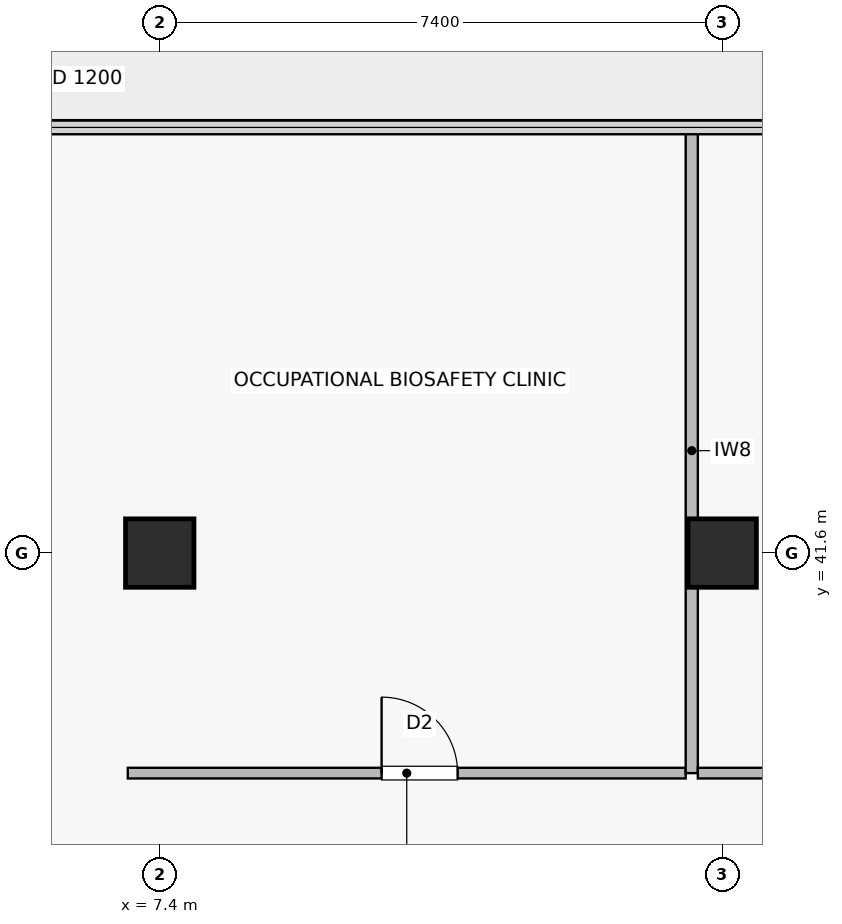
"""IFC4 building model, lengths in metres.
Left out: names, types, materials, properties, quantities, classifications, styles, units other than length and angle.
Written with IfcOpenShell. Run it as: python <this file> out.ifc"""

import sys

from ifc_helpers import new_model, si_unit, direction, frame, frame_2d, origin, origin_2d, place, context, subcontext, project, spatial, rectangle, extrude, source, transform, mapped, element, fill, save


model = new_model("IFC4")
c1 = context("Model", 3, precision=1e-05, world=origin(), true_north=direction((0.0, 1.0)))
c2 = subcontext(c1, "Body", "Model", "MODEL_VIEW")
j1 = project(units=[si_unit("LENGTHUNIT", "METRE"), si_unit("PLANEANGLEUNIT", "RADIAN")], contexts=[c1])
p1 = place(None, origin())
s1 = spatial("IfcSite", under=j1, at=p1, CompositionType="ELEMENT")
p2 = place(p1, origin())
s2 = spatial("IfcBuilding", under=s1, at=p2, CompositionType="ELEMENT")
p3 = place(p2, frame((0.0, 0.0, 113.3)))
s3 = spatial("IfcBuildingStorey", under=s2, at=p3, CompositionType="ELEMENT", Elevation=113.3)
m1 = source(origin(), c2, "Body", "SweptSolid", [
    extrude(rectangle(XDim=0.9, YDim=0.9, at=origin_2d()), origin(), (0.0, 0.0, 1.0), 4.1),
])
for number, where, z_axis, x_axis in (
    (1, (14.8, 41.6, 0.0), (0.0, 0.0, 1.0), (1.0, 0.0, 0.0)),
    (2, (7.4, 41.6, 0.0), (0.0, 0.0, 1.0), (1.0, 0.0, 0.0)),
):
    element("IfcColumn", number, at=place(p3, frame(where, z_axis=z_axis, x_axis=x_axis)), inside=s3, PredefinedType="COLUMN", context=c2, shape_type="MappedRepresentation", body=[
        mapped(m1, transform((0.0, 0.0, 0.0), scale=1.0)),
    ])
p4 = place(p3, frame((6.98, 38.705, 0.0), z_axis=(0.0, 0.0, 1.0), x_axis=(1.0, 0.0, 0.0)))
e3 = element("IfcWall", 3, at=p4, inside=s3, PredefinedType="PARTITIONING", context=c2, shape_type="SweptSolid", body=[
    extrude(rectangle(XDim=7.34, YDim=0.14, at=frame_2d((3.67, 0.0))), origin(), (0.0, 0.0, 1.0), 3.275),
])
p5 = place(p4, frame((3.339, 0.0, 0.0)))
e4 = element("IfcOpeningElement", 4, at=p5, cuts=e3, PredefinedType="OPENING", context=c2, shape_type="SweptSolid", body=[
    extrude(rectangle(XDim=1.0, YDim=2.15, at=frame_2d((0.5, 1.075))), frame((0.0, 0.08, 0.0), z_axis=(0.0, -1.0, 0.0), x_axis=(1.0, 0.0, 0.0)), (0.0, 0.0, 1.0), 0.16),
])
p6 = place(p3, frame((14.4, 38.705, 0.0), z_axis=(0.0, 0.0, 1.0), x_axis=(0.0, 1.0, 0.0)))
e5 = element("IfcWall", 5, at=p6, inside=s3, PredefinedType="PARTITIONING", context=c2, shape_type="SweptSolid", body=[
    extrude(rectangle(XDim=8.485, YDim=0.16, at=frame_2d((4.242, 0.0))), origin(), (0.0, 0.0, 1.0), 3.075),
])
p7 = place(p3, frame((14.48, 38.705, 0.0), z_axis=(0.0, 0.0, 1.0), x_axis=(1.0, 0.0, 0.0)))
e6 = element("IfcWall", 6, at=p7, inside=s3, PredefinedType="PARTITIONING", context=c2, shape_type="SweptSolid", body=[
    extrude(rectangle(XDim=12.24, YDim=0.14, at=frame_2d((6.12, 0.0))), origin(), (0.0, 0.0, 1.0), 3.125),
])
p8 = place(p7, frame((4.63, 0.0, 0.0)))
e7 = element("IfcOpeningElement", 7, at=p8, cuts=e6, PredefinedType="OPENING", context=c2, shape_type="SweptSolid", body=[
    extrude(rectangle(XDim=1.1, YDim=2.18, at=frame_2d((0.55, 1.09))), frame((0.0, 0.08, 0.0), z_axis=(0.0, -1.0, 0.0), x_axis=(1.0, 0.0, 0.0)), (0.0, 0.0, 1.0), 0.16),
])
m2 = source(origin(), c2, "Body", "SweptSolid", [
    extrude(rectangle(XDim=1.0, YDim=2.15, at=frame_2d((0.5, 1.075))), frame((0.0, 0.025, 0.0), z_axis=(0.0, -1.0, 0.0), x_axis=(1.0, 0.0, 0.0)), (0.0, 0.0, 1.0), 0.05),
])
p9 = place(p5, origin())
e8 = element("IfcDoor", 8, at=p9, inside=s3, OperationType="SINGLE_SWING_LEFT", PredefinedType="DOOR", context=c2, shape_type="MappedRepresentation", body=[
    mapped(m2, transform((0.0, 0.0, 0.0), scale=1.0)),
])
fill(e4, e8)
save(model, sys.argv[1])
